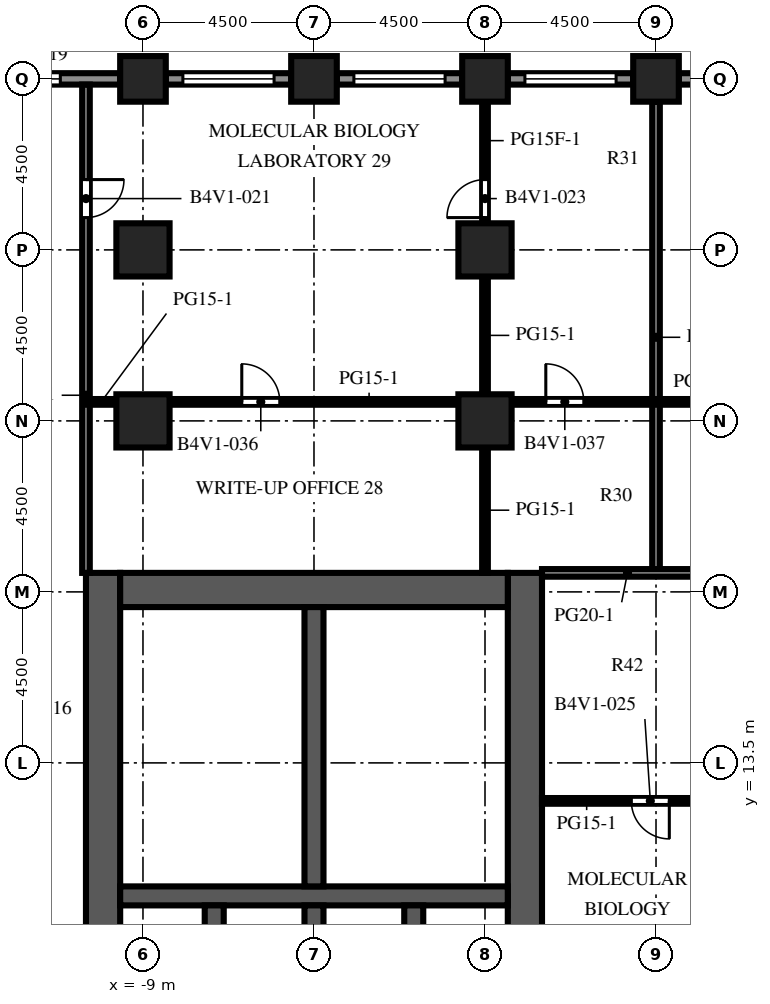
"""IFC4 building model, lengths in metres.
Left out: names, types, materials, properties, quantities, classifications, styles, units other than length and angle.
Written with IfcOpenShell. Run it as: python <this file> out.ifc"""

import sys

from ifc_helpers import new_model, si_unit, direction, frame, frame_2d, origin, origin_2d, place, context, subcontext, project, spatial, rectangle, extrude, element, fill, save


model = new_model("IFC4")
c1 = context("Model", 3, precision=1e-05, world=origin(), true_north=direction((0.0, 1.0)))
c2 = subcontext(c1, "Body", "Model", "MODEL_VIEW")
j1 = project(units=[si_unit("LENGTHUNIT", "METRE"), si_unit("PLANEANGLEUNIT", "RADIAN")], contexts=[c1])
p1 = place(None, origin())
s1 = spatial("IfcSite", under=j1, at=p1, CompositionType="ELEMENT")
p2 = place(p1, origin())
s2 = spatial("IfcBuilding", under=s1, at=p2, CompositionType="ELEMENT")
p3 = place(p2, frame((0.0, 0.0, 124.9)))
s3 = spatial("IfcBuildingStorey", under=s2, at=p3, CompositionType="ELEMENT", Elevation=124.9)
for number, where, z_axis, x_axis in (
    (1, (-9.0, 31.5, 0.0), (0.0, 0.0, 1.0), (1.0, 0.0, 0.0)),
    (2, (-4.5, 31.5, 0.0), (0.0, 0.0, 1.0), (1.0, 0.0, 0.0)),
    (3, (0.0, 31.5, 0.0), (0.0, 0.0, 1.0), (1.0, 0.0, 0.0)),
    (4, (4.5, 31.5, 0.0), (0.0, 0.0, 1.0), (1.0, 0.0, 0.0)),
):
    element("IfcColumn", number, at=place(p3, frame(where, z_axis=z_axis, x_axis=x_axis)), inside=s3, PredefinedType="COLUMN", context=c2, shape_type="SweptSolid", body=[
        extrude(rectangle(XDim=1.2, YDim=1.2, at=origin_2d()), origin(), (0.0, 0.0, 1.0), 4.1),
    ])
for number, where, z_axis, x_axis in (
    (5, (-9.0, 22.5, 0.0), (0.0, 0.0, 1.0), (1.0, 0.0, 0.0)),
    (6, (-9.0, 27.0, 0.0), (0.0, 0.0, 1.0), (1.0, 0.0, 0.0)),
    (7, (0.0, 22.5, 0.0), (0.0, 0.0, 1.0), (1.0, 0.0, 0.0)),
    (8, (0.0, 27.0, 0.0), (0.0, 0.0, 1.0), (1.0, 0.0, 0.0)),
):
    element("IfcColumn", number, at=place(p3, frame(where, z_axis=z_axis, x_axis=x_axis)), inside=s3, PredefinedType="COLUMN", context=c2, shape_type="SweptSolid", body=[
        extrude(rectangle(XDim=1.4, YDim=1.4, at=origin_2d()), origin(), (0.0, 0.0, 1.0), 4.1),
    ])
p4 = place(p3, frame((-10.05, -9.0, 0.0), z_axis=(0.0, 0.0, 1.0), x_axis=(0.0, 1.0, 0.0)))
e9 = element("IfcWall", 9, at=p4, inside=s3, PredefinedType="SHEAR", context=c2, shape_type="SweptSolid", body=[
    extrude(rectangle(XDim=27.5, YDim=0.9, at=frame_2d((13.75, 0.0))), origin(), (0.0, 0.0, 1.0), 4.1),
])
p5 = place(p4, frame((12.55, 0.0, 0.0)))
e10 = element("IfcOpeningElement", 10, at=p5, cuts=e9, PredefinedType="OPENING", context=c2, shape_type="SweptSolid", body=[
    extrude(rectangle(XDim=2.4, YDim=2.4, at=frame_2d((1.2, 1.2))), frame((0.0, 0.46, 0.0), z_axis=(0.0, -1.0, 0.0), x_axis=(1.0, 0.0, 0.0)), (0.0, 0.0, 1.0), 0.92),
])
p6 = place(p4, frame((6.825, 0.0, 0.0)))
e11 = element("IfcOpeningElement", 11, at=p6, cuts=e9, PredefinedType="OPENING", context=c2, shape_type="SweptSolid", body=[
    extrude(rectangle(XDim=1.2, YDim=2.1, at=frame_2d((0.6, 1.05))), frame((0.0, 0.46, 0.0), z_axis=(0.0, -1.0, 0.0), x_axis=(1.0, 0.0, 0.0)), (0.0, 0.0, 1.0), 0.92),
])
p7 = place(p4, frame((19.475, 0.0, 0.0)))
e12 = element("IfcOpeningElement", 12, at=p7, cuts=e9, PredefinedType="OPENING", context=c2, shape_type="SweptSolid", body=[
    extrude(rectangle(XDim=1.2, YDim=2.1, at=frame_2d((0.6, 1.05))), frame((0.0, 0.46, 0.0), z_axis=(0.0, -1.0, 0.0), x_axis=(1.0, 0.0, 0.0)), (0.0, 0.0, 1.0), 0.92),
])
p8 = place(p3, frame((1.05, -9.0, 0.0), z_axis=(0.0, 0.0, 1.0), x_axis=(0.0, 1.0, 0.0)))
e13 = element("IfcWall", 13, at=p8, inside=s3, PredefinedType="SHEAR", context=c2, shape_type="SweptSolid", body=[
    extrude(rectangle(XDim=27.5, YDim=0.9, at=frame_2d((13.75, 0.0))), origin(), (0.0, 0.0, 1.0), 4.1),
])
p9 = place(p8, frame((12.55, 0.0, 0.0)))
e14 = element("IfcOpeningElement", 14, at=p9, cuts=e13, PredefinedType="OPENING", context=c2, shape_type="SweptSolid", body=[
    extrude(rectangle(XDim=2.4, YDim=2.4, at=frame_2d((1.2, 1.2))), frame((0.0, 0.46, 0.0), z_axis=(0.0, -1.0, 0.0), x_axis=(1.0, 0.0, 0.0)), (0.0, 0.0, 1.0), 0.92),
])
p10 = place(p8, frame((3.975, 0.0, 0.0)))
e15 = element("IfcOpeningElement", 15, at=p10, cuts=e13, PredefinedType="OPENING", context=c2, shape_type="SweptSolid", body=[
    extrude(rectangle(XDim=1.2, YDim=2.1, at=frame_2d((0.6, 1.05))), frame((0.0, 0.46, 0.0), z_axis=(0.0, -1.0, 0.0), x_axis=(1.0, 0.0, 0.0)), (0.0, 0.0, 1.0), 0.92),
])
p11 = place(p8, frame((22.325, 0.0, 0.0)))
e16 = element("IfcOpeningElement", 16, at=p11, cuts=e13, PredefinedType="OPENING", context=c2, shape_type="SweptSolid", body=[
    extrude(rectangle(XDim=1.2, YDim=2.1, at=frame_2d((0.6, 1.05))), frame((0.0, 0.46, 0.0), z_axis=(0.0, -1.0, 0.0), x_axis=(1.0, 0.0, 0.0)), (0.0, 0.0, 1.0), 0.92),
])
p12 = place(p3, frame((-9.6, 18.05, 0.0), z_axis=(0.0, 0.0, 1.0), x_axis=(1.0, 0.0, 0.0)))
e17 = element("IfcWall", 17, at=p12, inside=s3, PredefinedType="SHEAR", context=c2, shape_type="SweptSolid", body=[
    extrude(rectangle(XDim=10.2, YDim=0.9, at=frame_2d((5.1, 0.0))), origin(), (0.0, 0.0, 1.0), 4.1),
])
p13 = place(p3, frame((-9.6, 10.0, 0.0), z_axis=(0.0, 0.0, 1.0), x_axis=(1.0, 0.0, 0.0)))
e18 = element("IfcWall", 18, at=p13, inside=s3, PredefinedType="SHEAR", context=c2, shape_type="SweptSolid", body=[
    extrude(rectangle(XDim=10.2, YDim=0.5, at=frame_2d((5.1, 0.0))), origin(), (0.0, 0.0, 1.0), 4.1),
])
for number, where, z_axis, x_axis in (
    (19, (-7.125, 6.95, 0.0), (0.0, 0.0, 1.0), (0.0, 1.0, 0.0)),
    (20, (-4.5, 6.95, 0.0), (0.0, 0.0, 1.0), (0.0, 1.0, 0.0)),
    (21, (-1.875, 6.95, 0.0), (0.0, 0.0, 1.0), (0.0, 1.0, 0.0)),
):
    element("IfcWall", number, at=place(p3, frame(where, z_axis=z_axis, x_axis=x_axis)), inside=s3, PredefinedType="SHEAR", context=c2, shape_type="SweptSolid", body=[
        extrude(rectangle(XDim=2.8, YDim=0.5, at=frame_2d((1.4, 0.0))), origin(), (0.0, 0.0, 1.0), 4.1),
    ])
p14 = place(p3, frame((-4.5, 10.25, 0.0), z_axis=(0.0, 0.0, 1.0), x_axis=(0.0, 1.0, 0.0)))
e22 = element("IfcWall", 22, at=p14, inside=s3, PredefinedType="SHEAR", context=c2, shape_type="SweptSolid", body=[
    extrude(rectangle(XDim=7.35, YDim=0.5, at=frame_2d((3.675, 0.0))), origin(), (0.0, 0.0, 1.0), 4.1),
])
p15 = place(p3, frame((5.1, 31.5, 0.0), z_axis=(0.0, 0.0, 1.0), x_axis=(1.0, 0.0, 0.0)))
e23 = element("IfcWall", 23, at=p15, inside=s3, PredefinedType="SOLIDWALL", context=c2, shape_type="SweptSolid", body=[
    extrude(rectangle(XDim=3.3, YDim=0.3, at=frame_2d((1.65, 0.0))), origin(), (0.0, 0.0, 1.0), 2.75),
])
p16 = place(p15, frame((0.45, 0.0, 0.8)))
e24 = element("IfcOpeningElement", 24, at=p16, cuts=e23, PredefinedType="OPENING", context=c2, shape_type="SweptSolid", body=[
    extrude(rectangle(XDim=2.4, YDim=1.7, at=frame_2d((1.2, 0.85))), frame((0.0, 0.16, 0.0), z_axis=(0.0, -1.0, 0.0), x_axis=(1.0, 0.0, 0.0)), (0.0, 0.0, 1.0), 0.32),
])
p17 = place(p3, frame((0.6, 31.5, 0.0), z_axis=(0.0, 0.0, 1.0), x_axis=(1.0, 0.0, 0.0)))
e25 = element("IfcWall", 25, at=p17, inside=s3, PredefinedType="SOLIDWALL", context=c2, shape_type="SweptSolid", body=[
    extrude(rectangle(XDim=3.3, YDim=0.3, at=frame_2d((1.65, 0.0))), origin(), (0.0, 0.0, 1.0), 2.75),
])
p18 = place(p17, frame((0.45, 0.0, 0.8)))
e26 = element("IfcOpeningElement", 26, at=p18, cuts=e25, PredefinedType="OPENING", context=c2, shape_type="SweptSolid", body=[
    extrude(rectangle(XDim=2.4, YDim=1.7, at=frame_2d((1.2, 0.85))), frame((0.0, 0.16, 0.0), z_axis=(0.0, -1.0, 0.0), x_axis=(1.0, 0.0, 0.0)), (0.0, 0.0, 1.0), 0.32),
])
p19 = place(p3, frame((-3.9, 31.5, 0.0), z_axis=(0.0, 0.0, 1.0), x_axis=(1.0, 0.0, 0.0)))
e27 = element("IfcWall", 27, at=p19, inside=s3, PredefinedType="SOLIDWALL", context=c2, shape_type="SweptSolid", body=[
    extrude(rectangle(XDim=3.3, YDim=0.3, at=frame_2d((1.65, 0.0))), origin(), (0.0, 0.0, 1.0), 2.75),
])
p20 = place(p19, frame((0.45, 0.0, 0.8)))
e28 = element("IfcOpeningElement", 28, at=p20, cuts=e27, PredefinedType="OPENING", context=c2, shape_type="SweptSolid", body=[
    extrude(rectangle(XDim=2.4, YDim=1.7, at=frame_2d((1.2, 0.85))), frame((0.0, 0.16, 0.0), z_axis=(0.0, -1.0, 0.0), x_axis=(1.0, 0.0, 0.0)), (0.0, 0.0, 1.0), 0.32),
])
p21 = place(p3, frame((-8.4, 31.5, 0.0), z_axis=(0.0, 0.0, 1.0), x_axis=(1.0, 0.0, 0.0)))
e29 = element("IfcWall", 29, at=p21, inside=s3, PredefinedType="SOLIDWALL", context=c2, shape_type="SweptSolid", body=[
    extrude(rectangle(XDim=3.3, YDim=0.3, at=frame_2d((1.65, 0.0))), origin(), (0.0, 0.0, 1.0), 2.75),
])
p22 = place(p21, frame((0.45, 0.0, 0.8)))
e30 = element("IfcOpeningElement", 30, at=p22, cuts=e29, PredefinedType="OPENING", context=c2, shape_type="SweptSolid", body=[
    extrude(rectangle(XDim=2.4, YDim=1.7, at=frame_2d((1.2, 0.85))), frame((0.0, 0.16, 0.0), z_axis=(0.0, -1.0, 0.0), x_axis=(1.0, 0.0, 0.0)), (0.0, 0.0, 1.0), 0.32),
])
p23 = place(p3, frame((-12.9, 31.5, 0.0), z_axis=(0.0, 0.0, 1.0), x_axis=(1.0, 0.0, 0.0)))
e31 = element("IfcWall", 31, at=p23, inside=s3, PredefinedType="SOLIDWALL", context=c2, shape_type="SweptSolid", body=[
    extrude(rectangle(XDim=3.3, YDim=0.3, at=frame_2d((1.65, 0.0))), origin(), (0.0, 0.0, 1.0), 2.75),
])
p24 = place(p23, frame((0.525, 0.0, 0.8)))
e32 = element("IfcOpeningElement", 32, at=p24, cuts=e31, PredefinedType="OPENING", context=c2, shape_type="SweptSolid", body=[
    extrude(rectangle(XDim=1.2, YDim=1.7, at=frame_2d((0.6, 0.85))), frame((0.0, 0.16, 0.0), z_axis=(0.0, -1.0, 0.0), x_axis=(1.0, 0.0, 0.0)), (0.0, 0.0, 1.0), 0.32),
])
p25 = place(p3, frame((-0.8, 10.25, 0.0), z_axis=(0.0, 0.0, 1.0), x_axis=(0.0, 1.0, 0.0)))
e33 = element("IfcWall", 33, at=p25, inside=s3, PredefinedType="PARTITIONING", context=c2, shape_type="SweptSolid", body=[
    extrude(rectangle(XDim=2.205, YDim=0.1, at=frame_2d((1.103, 0.0))), origin(), (0.0, 0.0, 1.0), 3.65),
])
p26 = place(p25, frame((0.603, 0.0, 0.0)))
e34 = element("IfcOpeningElement", 34, at=p26, cuts=e33, PredefinedType="OPENING", context=c2, shape_type="SweptSolid", body=[
    extrude(rectangle(XDim=1.0, YDim=2.1, at=frame_2d((0.5, 1.05))), frame((0.0, 0.06, 0.0), z_axis=(0.0, -1.0, 0.0), x_axis=(1.0, 0.0, 0.0)), (0.0, 0.0, 1.0), 0.12),
])
p27 = place(p3, frame((-0.8, 12.455, 0.0), z_axis=(0.0, 0.0, 1.0), x_axis=(0.0, 1.0, 0.0)))
e35 = element("IfcWall", 35, at=p27, inside=s3, PredefinedType="PARTITIONING", context=c2, shape_type="SweptSolid", body=[
    extrude(rectangle(XDim=2.352, YDim=0.1, at=frame_2d((1.176, 0.0))), origin(), (0.0, 0.0, 1.0), 3.65),
])
p28 = place(p27, frame((0.676, 0.0, 0.0)))
e36 = element("IfcOpeningElement", 36, at=p28, cuts=e35, PredefinedType="OPENING", context=c2, shape_type="SweptSolid", body=[
    extrude(rectangle(XDim=1.0, YDim=2.1, at=frame_2d((0.5, 1.05))), frame((0.0, 0.06, 0.0), z_axis=(0.0, -1.0, 0.0), x_axis=(1.0, 0.0, 0.0)), (0.0, 0.0, 1.0), 0.12),
])
p29 = place(p3, frame((-0.8, 14.807, 0.0), z_axis=(0.0, 0.0, 1.0), x_axis=(0.0, 1.0, 0.0)))
e37 = element("IfcWall", 37, at=p29, inside=s3, PredefinedType="PARTITIONING", context=c2, shape_type="SweptSolid", body=[
    extrude(rectangle(XDim=2.793, YDim=0.1, at=frame_2d((1.396, 0.0))), origin(), (0.0, 0.0, 1.0), 3.65),
])
p30 = place(p29, frame((0.896, 0.0, 0.0)))
e38 = element("IfcOpeningElement", 38, at=p30, cuts=e37, PredefinedType="OPENING", context=c2, shape_type="SweptSolid", body=[
    extrude(rectangle(XDim=1.0, YDim=2.1, at=frame_2d((0.5, 1.05))), frame((0.0, 0.06, 0.0), z_axis=(0.0, -1.0, 0.0), x_axis=(1.0, 0.0, 0.0)), (0.0, 0.0, 1.0), 0.12),
])
for number, where, z_axis, x_axis in (
    (39, (-4.25, 12.455, 0.0), (0.0, 0.0, 1.0), (1.0, 0.0, 0.0)),
    (40, (-4.25, 14.807, 0.0), (0.0, 0.0, 1.0), (1.0, 0.0, 0.0)),
):
    element("IfcWall", number, at=place(p3, frame(where, z_axis=z_axis, x_axis=x_axis)), inside=s3, PredefinedType="PARTITIONING", context=c2, shape_type="SweptSolid", body=[
        extrude(rectangle(XDim=3.45, YDim=0.1, at=frame_2d((1.725, 0.0))), origin(), (0.0, 0.0, 1.0), 3.65),
    ])
p31 = place(p3, frame((-10.5, 31.35, 0.0), z_axis=(0.0, 0.0, 1.0), x_axis=(0.0, -1.0, 0.0)))
e41 = element("IfcWall", 41, at=p31, inside=s3, PredefinedType="PARTITIONING", context=c2, shape_type="SweptSolid", body=[
    extrude(rectangle(XDim=12.85, YDim=0.2, at=frame_2d((6.425, 0.0))), origin(), (0.0, 0.0, 1.0), 3.65),
])
p32 = place(p31, frame((2.5, 0.0, 0.0)))
e42 = element("IfcOpeningElement", 42, at=p32, cuts=e41, PredefinedType="OPENING", context=c2, shape_type="SweptSolid", body=[
    extrude(rectangle(XDim=1.0, YDim=2.1, at=frame_2d((0.5, 1.05))), frame((0.0, 0.11, 0.0), z_axis=(0.0, -1.0, 0.0), x_axis=(1.0, 0.0, 0.0)), (0.0, 0.0, 1.0), 0.22),
])
p33 = place(p3, frame((0.0, 18.5, 0.0), z_axis=(0.0, 0.0, 1.0), x_axis=(0.0, 1.0, 0.0)))
e43 = element("IfcWall", 43, at=p33, inside=s3, PredefinedType="PARTITIONING", context=c2, shape_type="SweptSolid", body=[
    extrude(rectangle(XDim=3.3, YDim=0.15, at=frame_2d((1.65, 0.0))), origin(), (0.0, 0.0, 1.0), 3.65),
])
p34 = place(p3, frame((0.0, 23.2, 0.0), z_axis=(0.0, 0.0, 1.0), x_axis=(0.0, 1.0, 0.0)))
e44 = element("IfcWall", 44, at=p34, inside=s3, PredefinedType="PARTITIONING", context=c2, shape_type="SweptSolid", body=[
    extrude(rectangle(XDim=3.1, YDim=0.15, at=frame_2d((1.55, 0.0))), origin(), (0.0, 0.0, 1.0), 3.65),
])
p35 = place(p3, frame((0.0, 30.9, 0.0), z_axis=(0.0, 0.0, 1.0), x_axis=(0.0, -1.0, 0.0)))
e45 = element("IfcWall", 45, at=p35, inside=s3, PredefinedType="PARTITIONING", context=c2, shape_type="SweptSolid", body=[
    extrude(rectangle(XDim=3.2, YDim=0.15, at=frame_2d((1.6, 0.0))), origin(), (0.0, 0.0, 1.0), 3.65),
])
p36 = place(p35, frame((2.05, 0.0, 0.0)))
e46 = element("IfcOpeningElement", 46, at=p36, cuts=e45, PredefinedType="OPENING", context=c2, shape_type="SweptSolid", body=[
    extrude(rectangle(XDim=1.0, YDim=2.1, at=frame_2d((0.5, 1.05))), frame((0.0, 0.085, 0.0), z_axis=(0.0, -1.0, 0.0), x_axis=(1.0, 0.0, 0.0)), (0.0, 0.0, 1.0), 0.17),
])
p37 = place(p3, frame((4.5, 18.5, 0.0), z_axis=(0.0, 0.0, 1.0), x_axis=(0.0, 1.0, 0.0)))
e47 = element("IfcWall", 47, at=p37, inside=s3, PredefinedType="PARTITIONING", context=c2, shape_type="SweptSolid", body=[
    extrude(rectangle(XDim=12.4, YDim=0.2, at=frame_2d((6.2, 0.0))), origin(), (0.0, 0.0, 1.0), 3.65),
])
p38 = place(p3, frame((1.5, 12.5, 0.0), z_axis=(0.0, 0.0, 1.0), x_axis=(1.0, 0.0, 0.0)))
e48 = element("IfcWall", 48, at=p38, inside=s3, PredefinedType="PARTITIONING", context=c2, shape_type="SweptSolid", body=[
    extrude(rectangle(XDim=4.5, YDim=0.15, at=frame_2d((2.25, 0.0))), origin(), (0.0, 0.0, 1.0), 3.65),
])
p39 = place(p38, frame((2.35, 0.0, 0.0)))
e49 = element("IfcOpeningElement", 49, at=p39, cuts=e48, PredefinedType="OPENING", context=c2, shape_type="SweptSolid", body=[
    extrude(rectangle(XDim=1.0, YDim=2.1, at=frame_2d((0.5, 1.05))), frame((0.0, 0.085, 0.0), z_axis=(0.0, -1.0, 0.0), x_axis=(1.0, 0.0, 0.0)), (0.0, 0.0, 1.0), 0.17),
])
p40 = place(p3, frame((1.5, 18.5, 0.0), z_axis=(0.0, 0.0, 1.0), x_axis=(1.0, 0.0, 0.0)))
e50 = element("IfcWall", 50, at=p40, inside=s3, PredefinedType="PARTITIONING", context=c2, shape_type="SweptSolid", body=[
    extrude(rectangle(XDim=4.5, YDim=0.2, at=frame_2d((2.25, 0.0))), origin(), (0.0, 0.0, 1.0), 3.65),
])
p41 = place(p3, frame((-10.5, 23.0, 0.0), z_axis=(0.0, 0.0, 1.0), x_axis=(1.0, 0.0, 0.0)))
e51 = element("IfcWall", 51, at=p41, inside=s3, PredefinedType="PARTITIONING", context=c2, shape_type="SweptSolid", body=[
    extrude(rectangle(XDim=0.8, YDim=0.15, at=frame_2d((0.4, 0.0))), origin(), (0.0, 0.0, 1.0), 3.65),
])
p42 = place(p3, frame((-0.7, 23.0, 0.0), z_axis=(0.0, 0.0, 1.0), x_axis=(-1.0, 0.0, 0.0)))
e52 = element("IfcWall", 52, at=p42, inside=s3, PredefinedType="PARTITIONING", context=c2, shape_type="SweptSolid", body=[
    extrude(rectangle(XDim=7.6, YDim=0.15, at=frame_2d((3.8, 0.0))), origin(), (0.0, 0.0, 1.0), 3.65),
])
p43 = place(p42, frame((4.7, 0.0, 0.0)))
e53 = element("IfcOpeningElement", 53, at=p43, cuts=e52, PredefinedType="OPENING", context=c2, shape_type="SweptSolid", body=[
    extrude(rectangle(XDim=1.0, YDim=2.1, at=frame_2d((0.5, 1.05))), frame((0.0, 0.085, 0.0), z_axis=(0.0, -1.0, 0.0), x_axis=(1.0, 0.0, 0.0)), (0.0, 0.0, 1.0), 0.17),
])
p44 = place(p3, frame((8.3, 23.0, 0.0), z_axis=(0.0, 0.0, 1.0), x_axis=(-1.0, 0.0, 0.0)))
e54 = element("IfcWall", 54, at=p44, inside=s3, PredefinedType="PARTITIONING", context=c2, shape_type="SweptSolid", body=[
    extrude(rectangle(XDim=7.6, YDim=0.15, at=frame_2d((3.8, 0.0))), origin(), (0.0, 0.0, 1.0), 3.65),
])
p45 = place(p44, frame((5.7, 0.0, 0.0)))
e55 = element("IfcOpeningElement", 55, at=p45, cuts=e54, PredefinedType="OPENING", context=c2, shape_type="SweptSolid", body=[
    extrude(rectangle(XDim=1.0, YDim=2.1, at=frame_2d((0.5, 1.05))), frame((0.0, 0.085, 0.0), z_axis=(0.0, -1.0, 0.0), x_axis=(1.0, 0.0, 0.0)), (0.0, 0.0, 1.0), 0.17),
])
p46 = place(p18, origin())
e56 = element("IfcWindow", 56, at=p46, inside=s3, PartitioningType="SINGLE_PANEL", PredefinedType="WINDOW", context=c2, shape_type="SweptSolid", body=[
    extrude(rectangle(XDim=2.4, YDim=1.7, at=frame_2d((1.2, 0.85))), frame((0.0, 0.03, 0.0), z_axis=(0.0, -1.0, 0.0), x_axis=(1.0, 0.0, 0.0)), (0.0, 0.0, 1.0), 0.06),
])
fill(e26, e56)
p47 = place(p20, origin())
e57 = element("IfcWindow", 57, at=p47, inside=s3, PartitioningType="SINGLE_PANEL", PredefinedType="WINDOW", context=c2, shape_type="SweptSolid", body=[
    extrude(rectangle(XDim=2.4, YDim=1.7, at=frame_2d((1.2, 0.85))), frame((0.0, 0.03, 0.0), z_axis=(0.0, -1.0, 0.0), x_axis=(1.0, 0.0, 0.0)), (0.0, 0.0, 1.0), 0.06),
])
fill(e28, e57)
p48 = place(p22, origin())
e58 = element("IfcWindow", 58, at=p48, inside=s3, PartitioningType="SINGLE_PANEL", PredefinedType="WINDOW", context=c2, shape_type="SweptSolid", body=[
    extrude(rectangle(XDim=2.4, YDim=1.7, at=frame_2d((1.2, 0.85))), frame((0.0, 0.03, 0.0), z_axis=(0.0, -1.0, 0.0), x_axis=(1.0, 0.0, 0.0)), (0.0, 0.0, 1.0), 0.06),
])
fill(e30, e58)
p49 = place(p24, origin())
e59 = element("IfcWindow", 59, at=p49, inside=s3, PartitioningType="SINGLE_PANEL", PredefinedType="WINDOW", context=c2, shape_type="SweptSolid", body=[
    extrude(rectangle(XDim=1.2, YDim=1.7, at=frame_2d((0.6, 0.85))), frame((0.0, 0.03, 0.0), z_axis=(0.0, -1.0, 0.0), x_axis=(1.0, 0.0, 0.0)), (0.0, 0.0, 1.0), 0.06),
])
fill(e32, e59)
p50 = place(p7, origin())
e60 = element("IfcDoor", 60, at=p50, inside=s3, OperationType="SINGLE_SWING_LEFT", PredefinedType="DOOR", context=c2, shape_type="SweptSolid", body=[
    extrude(rectangle(XDim=1.2, YDim=2.1, at=frame_2d((0.6, 1.05))), frame((0.0, 0.025, 0.0), z_axis=(0.0, -1.0, 0.0), x_axis=(1.0, 0.0, 0.0)), (0.0, 0.0, 1.0), 0.05),
])
fill(e12, e60)
p51 = place(p11, origin())
e61 = element("IfcDoor", 61, at=p51, inside=s3, OperationType="SINGLE_SWING_LEFT", PredefinedType="DOOR", context=c2, shape_type="SweptSolid", body=[
    extrude(rectangle(XDim=1.2, YDim=2.1, at=frame_2d((0.6, 1.05))), frame((0.0, 0.425, 0.0), z_axis=(0.0, -1.0, 0.0), x_axis=(1.0, 0.0, 0.0)), (0.0, 0.0, 1.0), 0.05),
])
fill(e16, e61)
p52 = place(p26, origin())
e62 = element("IfcDoor", 62, at=p52, inside=s3, OperationType="SINGLE_SWING_RIGHT", PredefinedType="DOOR", context=c2, shape_type="SweptSolid", body=[
    extrude(rectangle(XDim=1.0, YDim=2.1, at=frame_2d((0.5, 1.05))), frame((0.0, 0.025, 0.0), z_axis=(0.0, -1.0, 0.0), x_axis=(1.0, 0.0, 0.0)), (0.0, 0.0, 1.0), 0.05),
])
fill(e34, e62)
p53 = place(p28, origin())
e63 = element("IfcDoor", 63, at=p53, inside=s3, OperationType="SINGLE_SWING_LEFT", PredefinedType="DOOR", context=c2, shape_type="SweptSolid", body=[
    extrude(rectangle(XDim=1.0, YDim=2.1, at=frame_2d((0.5, 1.05))), frame((0.0, 0.025, 0.0), z_axis=(0.0, -1.0, 0.0), x_axis=(1.0, 0.0, 0.0)), (0.0, 0.0, 1.0), 0.05),
])
fill(e36, e63)
p54 = place(p30, origin())
e64 = element("IfcDoor", 64, at=p54, inside=s3, OperationType="SINGLE_SWING_RIGHT", PredefinedType="DOOR", context=c2, shape_type="SweptSolid", body=[
    extrude(rectangle(XDim=1.0, YDim=2.1, at=frame_2d((0.5, 1.05))), frame((0.0, 0.025, 0.0), z_axis=(0.0, -1.0, 0.0), x_axis=(1.0, 0.0, 0.0)), (0.0, 0.0, 1.0), 0.05),
])
fill(e38, e64)
p55 = place(p32, origin())
e65 = element("IfcDoor", 65, at=p55, inside=s3, OperationType="SINGLE_SWING_LEFT", PredefinedType="DOOR", context=c2, shape_type="SweptSolid", body=[
    extrude(rectangle(XDim=1.0, YDim=2.1, at=frame_2d((0.5, 1.05))), frame((0.0, 0.025, 0.0), z_axis=(0.0, -1.0, 0.0), x_axis=(1.0, 0.0, 0.0)), (0.0, 0.0, 1.0), 0.05),
])
fill(e42, e65)
p56 = place(p36, origin())
e66 = element("IfcDoor", 66, at=p56, inside=s3, OperationType="SINGLE_SWING_RIGHT", PredefinedType="DOOR", context=c2, shape_type="SweptSolid", body=[
    extrude(rectangle(XDim=1.0, YDim=2.1, at=frame_2d((0.5, 1.05))), frame((0.0, 0.025, 0.0), z_axis=(0.0, -1.0, 0.0), x_axis=(1.0, 0.0, 0.0)), (0.0, 0.0, 1.0), 0.05),
])
fill(e46, e66)
p57 = place(p39, origin())
e67 = element("IfcDoor", 67, at=p57, inside=s3, OperationType="SINGLE_SWING_RIGHT", PredefinedType="DOOR", context=c2, shape_type="SweptSolid", body=[
    extrude(rectangle(XDim=1.0, YDim=2.1, at=frame_2d((0.5, 1.05))), frame((0.0, 0.025, 0.0), z_axis=(0.0, -1.0, 0.0), x_axis=(1.0, 0.0, 0.0)), (0.0, 0.0, 1.0), 0.05),
])
fill(e49, e67)
p58 = place(p43, origin())
e68 = element("IfcDoor", 68, at=p58, inside=s3, OperationType="SINGLE_SWING_RIGHT", PredefinedType="DOOR", context=c2, shape_type="SweptSolid", body=[
    extrude(rectangle(XDim=1.0, YDim=2.1, at=frame_2d((0.5, 1.05))), frame((0.0, 0.025, 0.0), z_axis=(0.0, -1.0, 0.0), x_axis=(1.0, 0.0, 0.0)), (0.0, 0.0, 1.0), 0.05),
])
fill(e53, e68)
p59 = place(p45, origin())
e69 = element("IfcDoor", 69, at=p59, inside=s3, OperationType="SINGLE_SWING_RIGHT", PredefinedType="DOOR", context=c2, shape_type="SweptSolid", body=[
    extrude(rectangle(XDim=1.0, YDim=2.1, at=frame_2d((0.5, 1.05))), frame((0.0, 0.025, 0.0), z_axis=(0.0, -1.0, 0.0), x_axis=(1.0, 0.0, 0.0)), (0.0, 0.0, 1.0), 0.05),
])
fill(e55, e69)
save(model, sys.argv[1])
